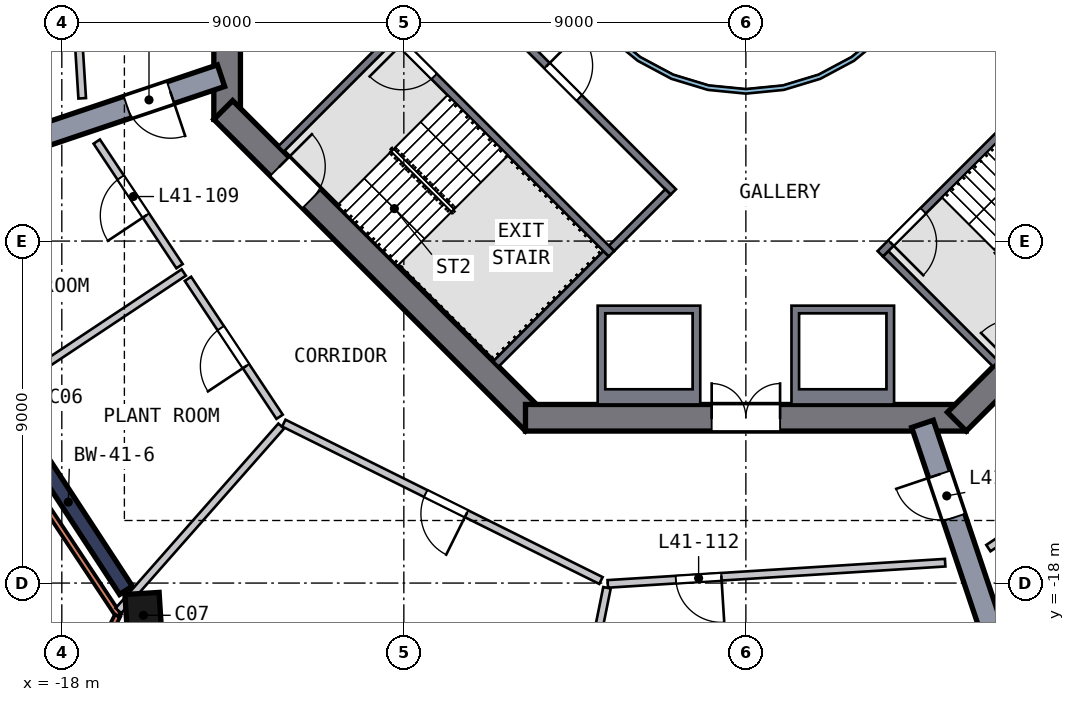
"""IFC4 building model, lengths in metres.
Left out: names, types, materials, properties, quantities, classifications, styles, units other than length and angle.
Written with IfcOpenShell. Run it as: python <this file> out.ifc"""

import sys

from ifc_helpers import new_model, si_unit, direction, frame, frame_2d, origin, origin_2d, place, context, subcontext, project, spatial, polyline, rectangle, outline, extrude, element, fill, save


model = new_model("IFC4")
c1 = context("Model", 3, precision=1e-05, world=origin(), true_north=direction((0.0, 1.0)))
c2 = subcontext(c1, "Body", "Model", "MODEL_VIEW")
j1 = project(units=[si_unit("LENGTHUNIT", "METRE"), si_unit("PLANEANGLEUNIT", "RADIAN")], contexts=[c1])
p1 = place(None, origin())
s1 = spatial("IfcSite", under=j1, at=p1, CompositionType="ELEMENT")
p2 = place(p1, origin())
s2 = spatial("IfcBuilding", under=s1, at=p2, CompositionType="ELEMENT")
p3 = place(p2, frame((0.0, 0.0, 169.0)))
s3 = spatial("IfcBuildingStorey", under=s2, at=p3, CompositionType="ELEMENT", Elevation=169.0)
p4 = place(p3, frame((-15.917, -18.795, 0.0), z_axis=(0.052718394, -0.043895911, 0.997644185), x_axis=(-0.060335894, 0.997068223, 0.047058892)))
e1 = element("IfcColumn", 1, at=p4, inside=s3, PredefinedType="COLUMN", context=c2, shape_type="SweptSolid", body=[
    extrude(rectangle(XDim=1.15, YDim=0.9, at=origin_2d()), origin(), (0.0, 0.0, 1.0), 4.511),
])
p5 = place(p3, frame((-13.65, 5.799, 0.0), z_axis=(0.0, 0.0, 1.0), x_axis=(0.0, -1.0, 0.0)))
e2 = element("IfcWall", 2, at=p5, inside=s3, PredefinedType="SHEAR", context=c2, shape_type="SweptSolid", body=[
    extrude(rectangle(XDim=11.598, YDim=0.7, at=frame_2d((5.799, 0.0))), origin(), (0.0, 0.0, 1.0), 6.0),
])
p6 = place(p5, frame((4.899, 0.0, 0.0)))
e3 = element("IfcOpeningElement", 3, at=p6, cuts=e2, PredefinedType="OPENING", context=c2, shape_type="SweptSolid", body=[
    extrude(rectangle(XDim=1.8, YDim=2.1, at=frame_2d((0.9, 1.05))), frame((0.0, 0.36, 0.0), z_axis=(0.0, -1.0, 0.0), x_axis=(1.0, 0.0, 0.0)), (0.0, 0.0, 1.0), 0.72),
])
p7 = place(p3, frame((-13.752, -5.552, 0.0), z_axis=(0.0, 0.0, 1.0), x_axis=(0.707106781, -0.707106781, 0.0)))
e4 = element("IfcWall", 4, at=p7, inside=s3, PredefinedType="SHEAR", context=c2, shape_type="SweptSolid", body=[
    extrude(rectangle(XDim=11.598, YDim=0.7, at=frame_2d((5.799, 0.0))), origin(), (0.0, 0.0, 1.0), 6.0),
])
p8 = place(p7, frame((2.099, 0.0, 0.0)))
e5 = element("IfcOpeningElement", 5, at=p8, cuts=e4, PredefinedType="OPENING", context=c2, shape_type="SweptSolid", body=[
    extrude(rectangle(XDim=1.2, YDim=2.1, at=frame_2d((0.6, 1.05))), frame((0.0, 0.36, 0.0), z_axis=(0.0, -1.0, 0.0), x_axis=(1.0, 0.0, 0.0)), (0.0, 0.0, 1.0), 0.72),
])
p9 = place(p3, frame((-5.799, -13.65, 0.0), z_axis=(0.0, 0.0, 1.0), x_axis=(1.0, 0.0, 0.0)))
e6 = element("IfcWall", 6, at=p9, inside=s3, PredefinedType="SHEAR", context=c2, shape_type="SweptSolid", body=[
    extrude(rectangle(XDim=11.598, YDim=0.7, at=frame_2d((5.799, 0.0))), origin(), (0.0, 0.0, 1.0), 6.0),
])
p10 = place(p9, frame((4.899, 0.0, 0.0)))
e7 = element("IfcOpeningElement", 7, at=p10, cuts=e6, PredefinedType="OPENING", context=c2, shape_type="SweptSolid", body=[
    extrude(rectangle(XDim=1.8, YDim=2.1, at=frame_2d((0.9, 1.05))), frame((0.0, 0.36, 0.0), z_axis=(0.0, -1.0, 0.0), x_axis=(1.0, 0.0, 0.0)), (0.0, 0.0, 1.0), 0.72),
])
p11 = place(p3, frame((5.552, -13.752, 0.0), z_axis=(0.0, 0.0, 1.0), x_axis=(0.707106781, 0.707106781, 0.0)))
e8 = element("IfcWall", 8, at=p11, inside=s3, PredefinedType="SHEAR", context=c2, shape_type="SweptSolid", body=[
    extrude(rectangle(XDim=11.598, YDim=0.7, at=frame_2d((5.799, 0.0))), origin(), (0.0, 0.0, 1.0), 6.0),
])
p12 = place(p11, frame((2.099, 0.0, 0.0)))
e9 = element("IfcOpeningElement", 9, at=p12, cuts=e8, PredefinedType="OPENING", context=c2, shape_type="SweptSolid", body=[
    extrude(rectangle(XDim=1.2, YDim=2.1, at=frame_2d((0.6, 1.05))), frame((0.0, 0.36, 0.0), z_axis=(0.0, -1.0, 0.0), x_axis=(1.0, 0.0, 0.0)), (0.0, 0.0, 1.0), 0.72),
])
p13 = place(p3, frame((-19.347, -13.549, 0.0), z_axis=(0.0, 0.0, 1.0), x_axis=(0.547293245, -0.83694092, 0.0)))
e10 = element("IfcWall", 10, at=p13, inside=s3, PredefinedType="SHEAR", context=c2, shape_type="SweptSolid", body=[
    extrude(rectangle(XDim=5.546, YDim=0.4, at=frame_2d((2.773, 0.0))), origin(), (0.0, 0.0, 1.0), 4.5),
])
p14 = place(p3, frame((-13.81, -4.648, 0.0), z_axis=(0.0, 0.0, 1.0), x_axis=(-0.947768972, -0.31895764, 0.0)))
e11 = element("IfcWall", 11, at=p14, inside=s3, PredefinedType="SHEAR", context=c2, shape_type="SweptSolid", body=[
    extrude(rectangle(XDim=9.171, YDim=0.6, at=frame_2d((4.586, 0.0))), origin(), (0.0, 0.0, 1.0), 4.5),
])
p15 = place(p14, frame((1.4, 0.0, 0.0)))
e12 = element("IfcOpeningElement", 12, at=p15, cuts=e11, PredefinedType="OPENING", context=c2, shape_type="SweptSolid", body=[
    extrude(rectangle(XDim=1.2, YDim=2.1, at=frame_2d((0.6, 1.05))), frame((0.0, 0.31, 0.0), z_axis=(0.0, -1.0, 0.0), x_axis=(1.0, 0.0, 0.0)), (0.0, 0.0, 1.0), 0.62),
])
p16 = place(p3, frame((4.648, -13.81, 0.0), z_axis=(0.0, 0.0, 1.0), x_axis=(0.31895764, -0.947768972, 0.0)))
e13 = element("IfcWall", 13, at=p16, inside=s3, PredefinedType="SHEAR", context=c2, shape_type="SweptSolid", body=[
    extrude(rectangle(XDim=9.171, YDim=0.6, at=frame_2d((4.586, 0.0))), origin(), (0.0, 0.0, 1.0), 4.5),
])
p17 = place(p16, frame((1.4, 0.0, 0.0)))
e14 = element("IfcOpeningElement", 14, at=p17, cuts=e13, PredefinedType="OPENING", context=c2, shape_type="SweptSolid", body=[
    extrude(rectangle(XDim=1.2, YDim=2.1, at=frame_2d((0.6, 1.05))), frame((0.0, 0.31, 0.0), z_axis=(0.0, -1.0, 0.0), x_axis=(1.0, 0.0, 0.0)), (0.0, 0.0, 1.0), 0.62),
])
p18 = place(p3, frame((-23.74, -7.969, 0.0), z_axis=(0.0, 0.0, 1.0), x_axis=(0.553385275, -0.832925409, 0.0)))
e15 = element("IfcWall", 15, at=p18, inside=s3, PredefinedType="SOLIDWALL", context=c2, shape_type="SweptSolid", body=[
    extrude(rectangle(XDim=13.075, YDim=0.15, at=frame_2d((6.538, 0.0))), origin(), (0.0, 0.0, 1.0), 4.5),
])
p19 = place(p3, frame((-16.536, -18.861, 0.0), z_axis=(0.0, 0.0, 1.0), x_axis=(-0.444709377, -0.895674924, 0.0)))
e16 = element("IfcWall", 16, at=p19, inside=s3, PredefinedType="SOLIDWALL", context=c2, shape_type="SweptSolid", body=[
    extrude(rectangle(XDim=0.937, YDim=0.15, at=frame_2d((0.468, 0.0))), origin(), (0.0, 0.0, 1.0), 4.5),
])
p20 = place(p3, origin())
e17 = element("IfcWall", 17, at=p20, inside=s3, PredefinedType="SOLIDWALL", context=c2, shape_type="SweptSolid", body=[
    extrude(outline(polyline([(-1.2, -13.3), (-3.9, -13.3), (-3.9, -10.7), (-1.2, -10.7), (-1.2, -13.3)]), holes=[polyline([(-3.7, -10.9), (-3.7, -12.9), (-1.4, -12.9), (-1.4, -10.9), (-3.7, -10.9)])]), origin(), (0.0, 0.0, 1.0), 5.55),
])
p21 = place(p3, origin())
e18 = element("IfcWall", 18, at=p21, inside=s3, PredefinedType="SOLIDWALL", context=c2, shape_type="SweptSolid", body=[
    extrude(outline(polyline([(3.9, -10.7), (3.9, -13.3), (1.2, -13.3), (1.2, -10.7), (3.9, -10.7)]), holes=[polyline([(1.4, -12.9), (3.7, -12.9), (3.7, -10.9), (1.4, -10.9), (1.4, -12.9)])]), origin(), (0.0, 0.0, 1.0), 5.55),
])
p22 = place(p3, frame((-3.535, -9.334, 0.0), z_axis=(0.0, 0.0, 1.0), x_axis=(-0.707120946, 0.707092617, 0.0)))
e19 = element("IfcWall", 19, at=p22, inside=s3, PredefinedType="SOLIDWALL", context=c2, shape_type="SweptSolid", body=[
    extrude(rectangle(XDim=8.618, YDim=0.2, at=frame_2d((4.309, 0.0))), origin(), (0.0, 0.0, 1.0), 5.55),
])
p23 = place(p22, frame((6.6, 0.0, 0.0)))
e20 = element("IfcOpeningElement", 20, at=p23, cuts=e19, PredefinedType="OPENING", context=c2, shape_type="SweptSolid", body=[
    extrude(rectangle(XDim=1.2, YDim=2.1, at=frame_2d((0.6, 1.05))), frame((0.0, 0.11, 0.0), z_axis=(0.0, -1.0, 0.0), x_axis=(1.0, 0.0, 0.0)), (0.0, 0.0, 1.0), 0.22),
])
for number, where, z_axis, x_axis in (
    (21, (-9.334, -3.677, 0.0), (0.0, 0.0, 1.0), (-0.707, -0.707, 0.0)),
    (22, (-3.677, -9.334, 0.0), (0.0, 0.0, 1.0), (-0.707, -0.707, 0.0)),
):
    element("IfcWall", number, at=place(p3, frame(where, z_axis=z_axis, x_axis=x_axis)), inside=s3, PredefinedType="SOLIDWALL", context=c2, shape_type="SweptSolid", body=[
        extrude(rectangle(XDim=4.1, YDim=0.2, at=frame_2d((2.05, 0.0))), origin(), (0.0, 0.0, 1.0), 5.55),
    ])
p24 = place(p3, frame((9.629, -3.24, 0.0), z_axis=(0.0, 0.0, 1.0), x_axis=(-0.707120946, -0.707092617, 0.0)))
e23 = element("IfcWall", 23, at=p24, inside=s3, PredefinedType="SOLIDWALL", context=c2, shape_type="SweptSolid", body=[
    extrude(rectangle(XDim=8.618, YDim=0.2, at=frame_2d((4.309, 0.0))), origin(), (0.0, 0.0, 1.0), 5.55),
])
p25 = place(p24, frame((7.018, 0.0, 0.0)))
e24 = element("IfcOpeningElement", 24, at=p25, cuts=e23, PredefinedType="OPENING", context=c2, shape_type="SweptSolid", body=[
    extrude(rectangle(XDim=1.2, YDim=2.1, at=frame_2d((0.6, 1.05))), frame((0.0, 0.11, 0.0), z_axis=(0.0, -1.0, 0.0), x_axis=(1.0, 0.0, 0.0)), (0.0, 0.0, 1.0), 0.22),
])
p26 = place(p3, frame((3.677, -9.334, 0.0), z_axis=(0.0, 0.0, 1.0), x_axis=(0.707106781, -0.707106781, 0.0)))
e25 = element("IfcWall", 25, at=p26, inside=s3, PredefinedType="SOLIDWALL", context=c2, shape_type="SweptSolid", body=[
    extrude(rectangle(XDim=4.1, YDim=0.2, at=frame_2d((2.05, 0.0))), origin(), (0.0, 0.0, 1.0), 5.55),
])
p27 = place(p3, frame((-7.708, -1.909, 0.0), z_axis=(0.0, 0.0, 1.0), x_axis=(0.707106781, -0.707106781, 0.0)))
e26 = element("IfcWall", 26, at=p27, inside=s3, PredefinedType="SOLIDWALL", context=c2, shape_type="SweptSolid", body=[
    extrude(rectangle(XDim=8.2, YDim=0.2, at=frame_2d((4.1, 0.0))), origin(), (0.0, 0.0, 1.0), 5.55),
])
p28 = place(p27, frame((3.5, 0.0, 0.0)))
e27 = element("IfcOpeningElement", 27, at=p28, cuts=e26, PredefinedType="OPENING", context=c2, shape_type="SweptSolid", body=[
    extrude(rectangle(XDim=1.2, YDim=2.1, at=frame_2d((0.6, 1.05))), frame((0.0, 0.11, 0.0), z_axis=(0.0, -1.0, 0.0), x_axis=(1.0, 0.0, 0.0)), (0.0, 0.0, 1.0), 0.22),
])
p29 = place(p3, frame((-2.051, -7.708, 0.0), z_axis=(0.0, 0.0, 1.0), x_axis=(-0.707106781, -0.707106781, 0.0)))
e28 = element("IfcWall", 28, at=p29, inside=s3, PredefinedType="SOLIDWALL", context=c2, shape_type="SweptSolid", body=[
    extrude(rectangle(XDim=2.1, YDim=0.2, at=frame_2d((1.05, 0.0))), origin(), (0.0, 0.0, 1.0), 5.55),
])
p30 = place(p3, origin())
e29 = element("IfcWall", 29, at=p30, inside=s3, PredefinedType="SOLIDWALL", context=c2, shape_type="SweptSolid", body=[
    extrude(outline(polyline([(5.021, -0.999), (4.73, -1.959), (4.257, -2.844), (3.62, -3.62), (2.844, -4.257), (1.959, -4.73), (0.999, -5.021), (0.0, -5.12), (-0.999, -5.021), (-1.959, -4.73), (-2.844, -4.257), (-3.62, -3.62), (-4.257, -2.844), (-4.73, -1.959), (-5.021, -0.999), (-5.12, 0.0), (-5.021, 0.999), (-4.73, 1.959), (-4.257, 2.844), (-3.62, 3.62), (-2.844, 4.257), (-1.959, 4.73), (-0.999, 5.021), (0.0, 5.12), (0.999, 5.021), (1.959, 4.73), (2.844, 4.257), (3.62, 3.62), (4.257, 2.844), (4.73, 1.959), (5.021, 0.999), (5.12, 0.0), (5.021, -0.999)]), holes=[polyline([(4.904, 0.976), (4.619, 1.913), (4.157, 2.778), (3.535, 3.535), (2.778, 4.157), (1.913, 4.619), (0.976, 4.904), (0.0, 5.0), (-0.976, 4.904), (-1.913, 4.619), (-2.778, 4.157), (-3.535, 3.535), (-4.157, 2.778), (-4.619, 1.913), (-4.904, 0.976), (-5.0, 0.0), (-4.904, -0.976), (-4.619, -1.913), (-4.157, -2.778), (-3.535, -3.535), (-2.778, -4.157), (-1.913, -4.619), (-0.976, -4.904), (0.0, -5.0), (0.976, -4.904), (1.913, -4.619), (2.778, -4.157), (3.535, -3.535), (4.157, -2.778), (4.619, -1.913), (4.904, -0.976), (5.0, 0.0), (4.904, 0.976)])]), origin(), (0.0, 0.0, 1.0), 5.55),
])
p31 = place(p3, frame((-17.711, -1.315, 0.0), z_axis=(0.0, 0.0, 1.0), x_axis=(0.062826175, -0.998024485, 0.0)))
e30 = element("IfcWall", 30, at=p31, inside=s3, PredefinedType="SOLIDWALL", context=c2, shape_type="SweptSolid", body=[
    extrude(rectangle(XDim=3.937, YDim=0.2, at=frame_2d((1.968, 0.0))), origin(), (0.0, 0.0, 1.0), 4.5),
])
p32 = place(p3, frame((-14.791, -9.827, 0.0), z_axis=(0.0, 0.0, 1.0), x_axis=(-0.832930583, -0.553377487, 0.0)))
e31 = element("IfcWall", 31, at=p32, inside=s3, PredefinedType="SOLIDWALL", context=c2, shape_type="SweptSolid", body=[
    extrude(rectangle(XDim=6.35, YDim=0.2, at=frame_2d((3.175, 0.0))), origin(), (0.0, 0.0, 1.0), 4.5),
])
p33 = place(p3, frame((-14.902, -9.661, 0.0), z_axis=(0.0, 0.0, 1.0), x_axis=(-0.553397114, 0.832917543, 0.0)))
e32 = element("IfcWall", 32, at=p33, inside=s3, PredefinedType="SOLIDWALL", context=c2, shape_type="SweptSolid", body=[
    extrude(rectangle(XDim=3.937, YDim=0.2, at=frame_2d((1.968, 0.0))), origin(), (0.0, 0.0, 1.0), 4.5),
])
p34 = place(p33, frame((1.6, 0.0, 0.0)))
e33 = element("IfcOpeningElement", 33, at=p34, cuts=e32, PredefinedType="OPENING", context=c2, shape_type="SweptSolid", body=[
    extrude(rectangle(XDim=1.2, YDim=2.1, at=frame_2d((0.6, 1.05))), frame((0.0, 0.11, 0.0), z_axis=(0.0, -1.0, 0.0), x_axis=(1.0, 0.0, 0.0)), (0.0, 0.0, 1.0), 0.22),
])
p35 = place(p3, frame((-12.227, -13.868, 0.0), z_axis=(0.0, 0.0, 1.0), x_axis=(-0.661318579, -0.750105151, 0.0)))
e34 = element("IfcWall", 34, at=p35, inside=s3, PredefinedType="SOLIDWALL", context=c2, shape_type="SweptSolid", body=[
    extrude(rectangle(XDim=6.476, YDim=0.2, at=frame_2d((3.238, 0.0))), origin(), (0.0, 0.0, 1.0), 4.5),
])
p36 = place(p3, frame((-12.269, -13.624, 0.0), z_axis=(0.0, 0.0, 1.0), x_axis=(-0.553393882, 0.832919691, 0.0)))
e35 = element("IfcWall", 35, at=p36, inside=s3, PredefinedType="SOLIDWALL", context=c2, shape_type="SweptSolid", body=[
    extrude(rectangle(XDim=4.358, YDim=0.2, at=frame_2d((2.179, 0.0))), origin(), (0.0, 0.0, 1.0), 4.5),
])
p37 = place(p36, frame((1.6, 0.0, 0.0)))
e36 = element("IfcOpeningElement", 36, at=p37, cuts=e35, PredefinedType="OPENING", context=c2, shape_type="SweptSolid", body=[
    extrude(rectangle(XDim=1.2, YDim=2.1, at=frame_2d((0.6, 1.05))), frame((0.0, 0.11, 0.0), z_axis=(0.0, -1.0, 0.0), x_axis=(1.0, 0.0, 0.0)), (0.0, 0.0, 1.0), 0.22),
])
p38 = place(p3, frame((-3.813, -17.933, 0.0), z_axis=(0.0, 0.0, 1.0), x_axis=(-0.895707541, 0.444643678, 0.0)))
e37 = element("IfcWall", 37, at=p38, inside=s3, PredefinedType="SOLIDWALL", context=c2, shape_type="SweptSolid", body=[
    extrude(rectangle(XDim=9.317, YDim=0.2, at=frame_2d((4.658, 0.0))), origin(), (0.0, 0.0, 1.0), 4.5),
])
p39 = place(p38, frame((3.95, 0.0, 0.0)))
e38 = element("IfcOpeningElement", 38, at=p39, cuts=e37, PredefinedType="OPENING", context=c2, shape_type="SweptSolid", body=[
    extrude(rectangle(XDim=1.2, YDim=2.1, at=frame_2d((0.6, 1.05))), frame((0.0, 0.11, 0.0), z_axis=(0.0, -1.0, 0.0), x_axis=(1.0, 0.0, 0.0)), (0.0, 0.0, 1.0), 0.22),
])
p40 = place(p3, frame((-3.654, -18.124, 0.0), z_axis=(0.0, 0.0, 1.0), x_axis=(-0.197670759, -0.980268469, 0.0)))
e39 = element("IfcWall", 39, at=p40, inside=s3, PredefinedType="SOLIDWALL", context=c2, shape_type="SweptSolid", body=[
    extrude(rectangle(XDim=5.526, YDim=0.2, at=frame_2d((2.763, 0.0))), origin(), (0.0, 0.0, 1.0), 4.5),
])
p41 = place(p3, frame((5.244, -17.463, 0.0), z_axis=(0.0, 0.0, 1.0), x_axis=(-0.998024606, -0.062824253, 0.0)))
e40 = element("IfcWall", 40, at=p41, inside=s3, PredefinedType="SOLIDWALL", context=c2, shape_type="SweptSolid", body=[
    extrude(rectangle(XDim=8.895, YDim=0.2, at=frame_2d((4.448, 0.0))), origin(), (0.0, 0.0, 1.0), 4.5),
])
p42 = place(p41, frame((5.9, 0.0, 0.0)))
e41 = element("IfcOpeningElement", 41, at=p42, cuts=e40, PredefinedType="OPENING", context=c2, shape_type="SweptSolid", body=[
    extrude(rectangle(XDim=1.2, YDim=2.1, at=frame_2d((0.6, 1.05))), frame((0.0, 0.11, 0.0), z_axis=(0.0, -1.0, 0.0), x_axis=(1.0, 0.0, 0.0)), (0.0, 0.0, 1.0), 0.22),
])
p43 = place(p3, frame((13.273, -12.502, 0.0), z_axis=(0.0, 0.0, 1.0), x_axis=(-0.832920887, -0.553392082, 0.0)))
e42 = element("IfcWall", 42, at=p43, inside=s3, PredefinedType="SOLIDWALL", context=c2, shape_type="SweptSolid", body=[
    extrude(rectangle(XDim=8.274, YDim=0.2, at=frame_2d((4.137, 0.0))), origin(), (0.0, 0.0, 1.0), 4.5),
])
p44 = place(p43, frame((0.2, 0.0, 0.0)))
e43 = element("IfcOpeningElement", 43, at=p44, cuts=e42, PredefinedType="OPENING", context=c2, shape_type="SweptSolid", body=[
    extrude(rectangle(XDim=1.2, YDim=2.1, at=frame_2d((0.6, 1.05))), frame((0.0, 0.11, 0.0), z_axis=(0.0, -1.0, 0.0), x_axis=(1.0, 0.0, 0.0)), (0.0, 0.0, 1.0), 0.22),
])
p45 = place(p23, origin())
e44 = element("IfcDoor", 44, at=p45, inside=s3, OperationType="SINGLE_SWING_RIGHT", PredefinedType="DOOR", context=c2, shape_type="SweptSolid", body=[
    extrude(rectangle(XDim=1.2, YDim=2.1, at=frame_2d((0.6, 1.05))), frame((0.0, 0.025, 0.0), z_axis=(0.0, -1.0, 0.0), x_axis=(1.0, 0.0, 0.0)), (0.0, 0.0, 1.0), 0.05),
])
fill(e20, e44)
p46 = place(p25, origin())
e45 = element("IfcDoor", 45, at=p46, inside=s3, OperationType="SINGLE_SWING_RIGHT", PredefinedType="DOOR", context=c2, shape_type="SweptSolid", body=[
    extrude(rectangle(XDim=1.2, YDim=2.1, at=frame_2d((0.6, 1.05))), frame((0.0, 0.025, 0.0), z_axis=(0.0, -1.0, 0.0), x_axis=(1.0, 0.0, 0.0)), (0.0, 0.0, 1.0), 0.05),
])
fill(e24, e45)
p47 = place(p10, origin())
e46 = element("IfcDoor", 46, at=p47, inside=s3, OperationType="DOUBLE_DOOR_SINGLE_SWING", PredefinedType="DOOR", context=c2, shape_type="SweptSolid", body=[
    extrude(rectangle(XDim=1.8, YDim=2.1, at=frame_2d((0.9, 1.05))), frame((0.0, 0.025, 0.0), z_axis=(0.0, -1.0, 0.0), x_axis=(1.0, 0.0, 0.0)), (0.0, 0.0, 1.0), 0.05),
])
fill(e7, e46)
p48 = place(p8, origin())
e47 = element("IfcDoor", 47, at=p48, inside=s3, OperationType="SINGLE_SWING_LEFT", PredefinedType="DOOR", context=c2, shape_type="SweptSolid", body=[
    extrude(rectangle(XDim=1.2, YDim=2.1, at=frame_2d((0.6, 1.05))), frame((0.0, 0.025, 0.0), z_axis=(0.0, -1.0, 0.0), x_axis=(1.0, 0.0, 0.0)), (0.0, 0.0, 1.0), 0.05),
])
fill(e5, e47)
p49 = place(p28, origin())
e48 = element("IfcDoor", 48, at=p49, inside=s3, OperationType="SINGLE_SWING_LEFT", PredefinedType="DOOR", context=c2, shape_type="SweptSolid", body=[
    extrude(rectangle(XDim=1.2, YDim=2.1, at=frame_2d((0.6, 1.05))), frame((0.0, 0.025, 0.0), z_axis=(0.0, -1.0, 0.0), x_axis=(1.0, 0.0, 0.0)), (0.0, 0.0, 1.0), 0.05),
])
fill(e27, e48)
p50 = place(p15, origin())
e49 = element("IfcDoor", 49, at=p50, inside=s3, OperationType="SINGLE_SWING_LEFT", PredefinedType="DOOR", context=c2, shape_type="SweptSolid", body=[
    extrude(rectangle(XDim=1.2, YDim=2.1, at=frame_2d((0.6, 1.05))), frame((0.0, 0.025, 0.0), z_axis=(0.0, -1.0, 0.0), x_axis=(1.0, 0.0, 0.0)), (0.0, 0.0, 1.0), 0.05),
])
fill(e12, e49)
p51 = place(p17, origin())
e50 = element("IfcDoor", 50, at=p51, inside=s3, OperationType="SINGLE_SWING_LEFT", PredefinedType="DOOR", context=c2, shape_type="SweptSolid", body=[
    extrude(rectangle(XDim=1.2, YDim=2.1, at=frame_2d((0.6, 1.05))), frame((0.0, 0.025, 0.0), z_axis=(0.0, -1.0, 0.0), x_axis=(1.0, 0.0, 0.0)), (0.0, 0.0, 1.0), 0.05),
])
fill(e14, e50)
p52 = place(p34, origin())
e51 = element("IfcDoor", 51, at=p52, inside=s3, OperationType="SINGLE_SWING_LEFT", PredefinedType="DOOR", context=c2, shape_type="SweptSolid", body=[
    extrude(rectangle(XDim=1.2, YDim=2.1, at=frame_2d((0.6, 1.05))), frame((0.0, 0.025, 0.0), z_axis=(0.0, -1.0, 0.0), x_axis=(1.0, 0.0, 0.0)), (0.0, 0.0, 1.0), 0.05),
])
fill(e33, e51)
p53 = place(p37, origin())
e52 = element("IfcDoor", 52, at=p53, inside=s3, OperationType="SINGLE_SWING_LEFT", PredefinedType="DOOR", context=c2, shape_type="SweptSolid", body=[
    extrude(rectangle(XDim=1.2, YDim=2.1, at=frame_2d((0.6, 1.05))), frame((0.0, 0.025, 0.0), z_axis=(0.0, -1.0, 0.0), x_axis=(1.0, 0.0, 0.0)), (0.0, 0.0, 1.0), 0.05),
])
fill(e36, e52)
p54 = place(p39, origin())
e53 = element("IfcDoor", 53, at=p54, inside=s3, OperationType="SINGLE_SWING_LEFT", PredefinedType="DOOR", context=c2, shape_type="SweptSolid", body=[
    extrude(rectangle(XDim=1.2, YDim=2.1, at=frame_2d((0.6, 1.05))), frame((0.0, 0.025, 0.0), z_axis=(0.0, -1.0, 0.0), x_axis=(1.0, 0.0, 0.0)), (0.0, 0.0, 1.0), 0.05),
])
fill(e38, e53)
p55 = place(p42, origin())
e54 = element("IfcDoor", 54, at=p55, inside=s3, OperationType="SINGLE_SWING_LEFT", PredefinedType="DOOR", context=c2, shape_type="SweptSolid", body=[
    extrude(rectangle(XDim=1.2, YDim=2.1, at=frame_2d((0.6, 1.05))), frame((0.0, 0.025, 0.0), z_axis=(0.0, -1.0, 0.0), x_axis=(1.0, 0.0, 0.0)), (0.0, 0.0, 1.0), 0.05),
])
fill(e41, e54)
save(model, sys.argv[1])
